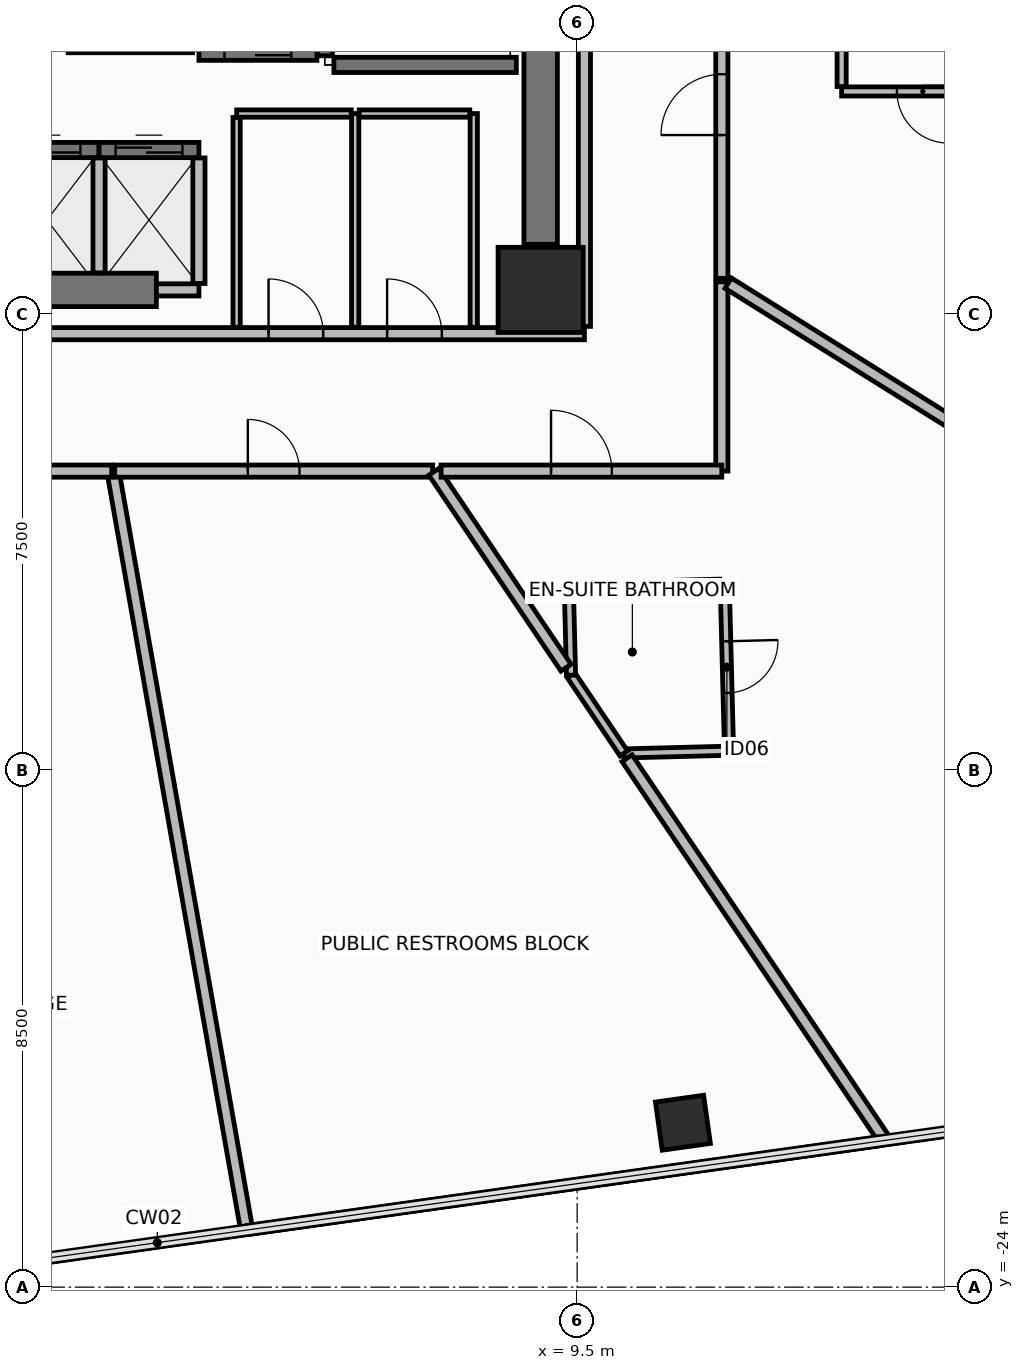
"""IFC4 building model, lengths in metres.
Left out: names, types, materials, properties, quantities, classifications, styles, units other than length and angle.
Written with IfcOpenShell. Run it as: python <this file> out.ifc"""

import sys

from ifc_helpers import new_model, si_unit, direction, frame, frame_2d, origin, origin_2d, place, context, subcontext, project, spatial, rectangle, hollow_rectangle, extrude, element, fill, save


model = new_model("IFC4")
c1 = context("Model", 3, precision=1e-05, world=origin(), true_north=direction((0.0, 1.0)))
c2 = subcontext(c1, "Body", "Model", "MODEL_VIEW")
j1 = project(units=[si_unit("LENGTHUNIT", "METRE"), si_unit("PLANEANGLEUNIT", "RADIAN")], contexts=[c1])
p1 = place(None, origin())
s1 = spatial("IfcSite", under=j1, at=p1, CompositionType="ELEMENT")
p2 = place(p1, origin())
s2 = spatial("IfcBuilding", under=s1, at=p2, CompositionType="ELEMENT")
p3 = place(p2, frame((0.0, 0.0, 57.0)))
s3 = spatial("IfcBuildingStorey", under=s2, at=p3, CompositionType="ELEMENT", Elevation=57.0)
p4 = place(p3, frame((8.9, -7.6, 0.0), z_axis=(0.0, 0.0, 1.0), x_axis=(1.0, 0.0, 0.0)))
e1 = element("IfcColumn", 1, at=p4, inside=s3, PredefinedType="COLUMN", context=c2, shape_type="SweptSolid", body=[
    extrude(rectangle(XDim=1.4, YDim=1.4, at=origin_2d()), origin(), (0.0, 0.0, 1.0), 3.45),
])
p5 = place(p3, frame((11.24, -21.296, 0.0), z_axis=(0.0, 0.0, 1.0), x_axis=(0.990268068742, 0.13917310096, 0.0)))
e2 = element("IfcColumn", 2, at=p5, inside=s3, PredefinedType="COLUMN", context=c2, shape_type="SweptSolid", body=[
    extrude(hollow_rectangle(XDim=0.8, YDim=0.8, WallThickness=0.045, at=origin_2d()), origin(), (0.0, 0.0, 1.0), 3.45),
])
p6 = place(p3, frame((-2.8, -7.6, 0.0), z_axis=(0.0, 0.0, 1.0), x_axis=(1.0, 0.0, 0.0)))
e3 = element("IfcWall", 3, at=p6, inside=s3, PredefinedType="SHEAR", context=c2, shape_type="SweptSolid", body=[
    extrude(rectangle(XDim=5.38, YDim=0.55, at=frame_2d((2.69, 0.0))), origin(), (0.0, 0.0, 1.0), 3.275),
])
p7 = place(p3, frame((8.9, -6.85, 0.0), z_axis=(0.0, 0.0, 1.0), x_axis=(0.0, 1.0, 0.0)))
e4 = element("IfcWall", 4, at=p7, inside=s3, PredefinedType="SHEAR", context=c2, shape_type="SweptSolid", body=[
    extrude(rectangle(XDim=10.7, YDim=0.55, at=frame_2d((5.35, 0.0))), origin(), (0.0, 0.0, 1.0), 3.275),
])
p8 = place(p3, frame((-9.62, -8.32, 0.0), z_axis=(0.0, 0.0, 1.0), x_axis=(1.0, 0.0, 0.0)))
e5 = element("IfcWall", 5, at=p8, inside=s3, PredefinedType="PARTITIONING", context=c2, shape_type="SweptSolid", body=[
    extrude(rectangle(XDim=19.24, YDim=0.2, at=frame_2d((9.62, 0.0))), origin(), (0.0, 0.0, 1.0), 2.67),
])
p9 = place(p8, frame((14.045, 0.0, 0.0)))
e6 = element("IfcOpeningElement", 6, at=p9, cuts=e5, PredefinedType="OPENING", context=c2, shape_type="SweptSolid", body=[
    extrude(rectangle(XDim=0.9, YDim=2.1, at=frame_2d((0.45, 1.05))), frame((0.0, 0.11, 0.0), z_axis=(0.0, -1.0, 0.0), x_axis=(1.0, 0.0, 0.0)), (0.0, 0.0, 1.0), 0.22),
])
p10 = place(p8, frame((15.995, 0.0, 0.0)))
e7 = element("IfcOpeningElement", 7, at=p10, cuts=e5, PredefinedType="OPENING", context=c2, shape_type="SweptSolid", body=[
    extrude(rectangle(XDim=0.9, YDim=2.1, at=frame_2d((0.45, 1.05))), frame((0.0, 0.11, 0.0), z_axis=(0.0, -1.0, 0.0), x_axis=(1.0, 0.0, 0.0)), (0.0, 0.0, 1.0), 0.22),
])
p11 = place(p3, frame((9.62, -8.2, 0.0), z_axis=(0.0, 0.0, 1.0), x_axis=(0.0, 1.0, 0.0)))
e8 = element("IfcWall", 8, at=p11, inside=s3, PredefinedType="PARTITIONING", context=c2, shape_type="SweptSolid", body=[
    extrude(rectangle(XDim=16.4, YDim=0.2, at=frame_2d((8.2, 0.0))), origin(), (0.0, 0.0, 1.0), 2.67),
])
p12 = place(p11, frame((12.65, 0.0, 0.0)))
e9 = element("IfcOpeningElement", 9, at=p12, cuts=e8, PredefinedType="OPENING", context=c2, shape_type="SweptSolid", body=[
    extrude(rectangle(XDim=1.1, YDim=2.15, at=frame_2d((0.55, 1.075))), frame((0.0, 0.11, 0.0), z_axis=(0.0, -1.0, 0.0), x_axis=(1.0, 0.0, 0.0)), (0.0, 0.0, 1.0), 0.22),
])
p13 = place(p3, frame((5.35, -3.75, 0.0), z_axis=(0.0, 0.0, 1.0), x_axis=(0.0, 1.0, 0.0)))
e10 = element("IfcWall", 10, at=p13, inside=s3, PredefinedType="SHEAR", context=c2, shape_type="SweptSolid", body=[
    extrude(rectangle(XDim=7.3, YDim=0.25, at=frame_2d((3.65, 0.0))), origin(), (0.0, 0.0, 1.0), 3.275),
])
p14 = place(p3, frame((5.5, -3.9, 0.0), z_axis=(0.0, 0.0, 1.0), x_axis=(1.0, 0.0, 0.0)))
e11 = element("IfcWall", 11, at=p14, inside=s3, PredefinedType="SHEAR", context=c2, shape_type="SweptSolid", body=[
    extrude(rectangle(XDim=3.0, YDim=0.25, at=frame_2d((1.5, 0.0))), origin(), (0.0, 0.0, 1.0), 3.275),
])
p15 = place(p3, frame((-0.075, -5.3, 0.0), z_axis=(0.0, 0.0, 1.0), x_axis=(1.0, 0.0, 0.0)))
e12 = element("IfcWall", 12, at=p15, inside=s3, PredefinedType="SHEAR", context=c2, shape_type="SweptSolid", body=[
    extrude(rectangle(XDim=1.712, YDim=0.25, at=frame_2d((0.856, 0.0))), origin(), (0.0, 0.0, 1.0), 3.275),
])
p16 = place(p15, frame((0.306, 0.0, 0.0)))
e13 = element("IfcOpeningElement", 13, at=p16, cuts=e12, PredefinedType="OPENING", context=c2, shape_type="SweptSolid", body=[
    extrude(rectangle(XDim=1.1, YDim=2.2, at=frame_2d((0.55, 1.1))), frame((0.0, 0.135, 0.0), z_axis=(0.0, -1.0, 0.0), x_axis=(1.0, 0.0, 0.0)), (0.0, 0.0, 1.0), 0.27),
])
p17 = place(p3, frame((1.637, -7.32, 0.0), z_axis=(0.0, 0.0, 1.0), x_axis=(0.0, 1.0, 0.0)))
e14 = element("IfcWall", 14, at=p17, inside=s3, PredefinedType="PARTITIONING", context=c2, shape_type="SweptSolid", body=[
    extrude(rectangle(XDim=1.89, YDim=0.2, at=frame_2d((0.945, 0.0))), origin(), (0.0, 0.0, 1.0), 3.275),
])
p18 = place(p3, frame((1.637, -5.3, 0.0), z_axis=(0.0, 0.0, 1.0), x_axis=(1.0, 0.0, 0.0)))
e15 = element("IfcWall", 15, at=p18, inside=s3, PredefinedType="SHEAR", context=c2, shape_type="SweptSolid", body=[
    extrude(rectangle(XDim=1.643, YDim=0.25, at=frame_2d((0.821, 0.0))), origin(), (0.0, 0.0, 1.0), 3.275),
])
p19 = place(p18, frame((0.271, 0.0, 0.0)))
e16 = element("IfcOpeningElement", 16, at=p19, cuts=e15, PredefinedType="OPENING", context=c2, shape_type="SweptSolid", body=[
    extrude(rectangle(XDim=1.1, YDim=2.2, at=frame_2d((0.55, 1.1))), frame((0.0, 0.135, 0.0), z_axis=(0.0, -1.0, 0.0), x_axis=(1.0, 0.0, 0.0)), (0.0, 0.0, 1.0), 0.27),
])
p20 = place(p3, frame((2.58, -7.6, 0.0), z_axis=(0.0, 0.0, 1.0), x_axis=(1.0, 0.0, 0.0)))
e17 = element("IfcWall", 17, at=p20, inside=s3, PredefinedType="PARTITIONING", context=c2, shape_type="SweptSolid", body=[
    extrude(rectangle(XDim=0.7, YDim=0.2, at=frame_2d((0.35, 0.0))), origin(), (0.0, 0.0, 1.0), 2.47),
])
p21 = place(p3, frame((3.28, -7.495, 0.0), z_axis=(0.0, 0.0, 1.0), x_axis=(0.0, 1.0, 0.0)))
e18 = element("IfcWall", 18, at=p21, inside=s3, PredefinedType="PARTITIONING", context=c2, shape_type="SweptSolid", body=[
    extrude(rectangle(XDim=2.065, YDim=0.2, at=frame_2d((1.033, 0.0))), origin(), (0.0, 0.0, 1.0), 2.47),
])
p22 = place(p3, frame((1.13, -3.6, 0.0), z_axis=(0.0, 0.0, 1.0), x_axis=(1.0, 0.0, 0.0)))
e19 = element("IfcWall", 19, at=p22, inside=s3, PredefinedType="PARTITIONING", context=c2, shape_type="SweptSolid", body=[
    extrude(rectangle(XDim=2.045, YDim=0.2, at=frame_2d((1.022, 0.0))), origin(), (0.0, 0.0, 1.0), 3.275),
])
p23 = place(p3, frame((3.28, -3.7, 0.0), z_axis=(0.0, 0.0, 1.0), x_axis=(1.0, 0.0, 0.0)))
e20 = element("IfcWall", 20, at=p23, inside=s3, PredefinedType="SHEAR", context=c2, shape_type="SweptSolid", body=[
    extrude(rectangle(XDim=1.94, YDim=0.25, at=frame_2d((0.97, 0.0))), origin(), (0.0, 0.0, 1.0), 3.275),
])
p24 = place(p23, frame((0.42, 0.0, 0.0)))
e21 = element("IfcOpeningElement", 21, at=p24, cuts=e20, PredefinedType="OPENING", context=c2, shape_type="SweptSolid", body=[
    extrude(rectangle(XDim=1.1, YDim=2.2, at=frame_2d((0.55, 1.1))), frame((0.0, 0.135, 0.0), z_axis=(0.0, -1.0, 0.0), x_axis=(1.0, 0.0, 0.0)), (0.0, 0.0, 1.0), 0.27),
])
p25 = place(p3, frame((5.85, -8.215, 0.0), z_axis=(0.0, 0.0, 1.0), x_axis=(0.0, 1.0, 0.0)))
e22 = element("IfcWall", 22, at=p25, inside=s3, PredefinedType="PARTITIONING", context=c2, shape_type="SweptSolid", body=[
    extrude(rectangle(XDim=3.515, YDim=0.12, at=frame_2d((1.758, 0.0))), origin(), (0.0, 0.0, 1.0), 2.47),
])
p26 = place(p3, frame((5.785, -4.7, 0.0), z_axis=(0.0, 0.0, 1.0), x_axis=(-1.0, 0.0, 0.0)))
e23 = element("IfcWall", 23, at=p26, inside=s3, PredefinedType="PARTITIONING", context=c2, shape_type="SweptSolid", body=[
    extrude(rectangle(XDim=1.885, YDim=0.12, at=frame_2d((0.942, 0.0))), origin(), (0.0, 0.0, 1.0), 3.275),
])
p27 = place(p3, frame((3.9, -4.765, 0.0), z_axis=(0.0, 0.0, 1.0), x_axis=(0.0, -1.0, 0.0)))
e24 = element("IfcWall", 24, at=p27, inside=s3, PredefinedType="PARTITIONING", context=c2, shape_type="SweptSolid", body=[
    extrude(rectangle(XDim=3.45, YDim=0.12, at=frame_2d((1.725, 0.0))), origin(), (0.0, 0.0, 1.0), 2.47),
])
p28 = place(p3, frame((7.8, -8.215, 0.0), z_axis=(0.0, 0.0, 1.0), x_axis=(0.0, 1.0, 0.0)))
e25 = element("IfcWall", 25, at=p28, inside=s3, PredefinedType="PARTITIONING", context=c2, shape_type="SweptSolid", body=[
    extrude(rectangle(XDim=3.515, YDim=0.12, at=frame_2d((1.758, 0.0))), origin(), (0.0, 0.0, 1.0), 2.47),
])
p29 = place(p3, frame((7.735, -4.7, 0.0), z_axis=(0.0, 0.0, 1.0), x_axis=(-1.0, 0.0, 0.0)))
e26 = element("IfcWall", 26, at=p29, inside=s3, PredefinedType="PARTITIONING", context=c2, shape_type="SweptSolid", body=[
    extrude(rectangle(XDim=1.82, YDim=0.12, at=frame_2d((0.91, 0.0))), origin(), (0.0, 0.0, 1.0), 3.275),
])
p30 = place(p3, frame((11.927, -12.429, 0.0), z_axis=(0.0, 0.0, 1.0), x_axis=(0.025746347005, -0.999668507864, 0.0)))
e27 = element("IfcWall", 27, at=p30, inside=s3, PredefinedType="PARTITIONING", context=c2, shape_type="SweptSolid", body=[
    extrude(rectangle(XDim=2.75, YDim=0.15, at=frame_2d((1.375, 0.0))), origin(), (0.0, 0.0, 1.0), 2.87),
])
p31 = place(p30, frame((0.95, 0.0, 0.0)))
e28 = element("IfcOpeningElement", 28, at=p31, cuts=e27, PredefinedType="OPENING", context=c2, shape_type="SweptSolid", body=[
    extrude(rectangle(XDim=0.85, YDim=2.1, at=frame_2d((0.425, 1.05))), frame((0.0, 0.085, 0.0), z_axis=(0.0, -1.0, 0.0), x_axis=(1.0, 0.0, 0.0)), (0.0, 0.0, 1.0), 0.17),
])
p32 = place(p3, frame((11.998, -15.178, 0.0), z_axis=(0.0, 0.0, 1.0), x_axis=(-0.999670410654, -0.025672359918, 0.0)))
e29 = element("IfcWall", 29, at=p32, inside=s3, PredefinedType="PARTITIONING", context=c2, shape_type="SweptSolid", body=[
    extrude(rectangle(XDim=1.731, YDim=0.15, at=frame_2d((0.865, 0.0))), origin(), (0.0, 0.0, 1.0), 2.67),
])
p33 = place(p3, frame((10.268, -15.223, 0.0), z_axis=(0.0, 0.0, 1.0), x_axis=(-0.559229675695, 0.82901276819, 0.0)))
e30 = element("IfcWall", 30, at=p33, inside=s3, PredefinedType="PARTITIONING", context=c2, shape_type="SweptSolid", body=[
    extrude(rectangle(XDim=1.552, YDim=0.15, at=frame_2d((0.776, 0.0))), origin(), (0.0, 0.0, 1.0), 2.67),
])
p34 = place(p3, frame((9.4, -13.936, 0.0), z_axis=(0.0, 0.0, 1.0), x_axis=(-0.025745445057, 0.999668531094, 0.0)))
e31 = element("IfcWall", 31, at=p34, inside=s3, PredefinedType="PARTITIONING", context=c2, shape_type="SweptSolid", body=[
    extrude(rectangle(XDim=1.441, YDim=0.15, at=frame_2d((0.721, 0.0))), origin(), (0.0, 0.0, 1.0), 3.275),
])
p35 = place(p3, frame((9.443, -12.493, 0.0), z_axis=(0.0, 0.0, 1.0), x_axis=(0.999667618691, 0.025780848324, 0.0)))
e32 = element("IfcWall", 32, at=p35, inside=s3, PredefinedType="PARTITIONING", context=c2, shape_type="SweptSolid", body=[
    extrude(rectangle(XDim=2.405, YDim=0.15, at=frame_2d((1.203, 0.0))), origin(), (0.0, 0.0, 1.0), 2.67),
])
p36 = place(p3, frame((16.52, -4.336, 0.0), z_axis=(0.0, 0.0, 1.0), x_axis=(-1.0, 0.0, 0.0)))
e33 = element("IfcWall", 33, at=p36, inside=s3, PredefinedType="PARTITIONING", context=c2, shape_type="SweptSolid", body=[
    extrude(rectangle(XDim=2.67, YDim=0.15, at=frame_2d((1.335, 0.0))), origin(), (0.0, 0.0, 1.0), 2.67),
])
p37 = place(p36, frame((0.91, 0.0, 0.0)))
e34 = element("IfcOpeningElement", 34, at=p37, cuts=e33, PredefinedType="OPENING", context=c2, shape_type="SweptSolid", body=[
    extrude(rectangle(XDim=0.85, YDim=2.1, at=frame_2d((0.425, 1.05))), frame((0.0, 0.085, 0.0), z_axis=(0.0, -1.0, 0.0), x_axis=(1.0, 0.0, 0.0)), (0.0, 0.0, 1.0), 0.17),
])
p38 = place(p3, frame((13.85, -4.257, 0.0), z_axis=(0.0, 0.0, 1.0), x_axis=(0.0, 1.0, 0.0)))
e35 = element("IfcWall", 35, at=p38, inside=s3, PredefinedType="PARTITIONING", context=c2, shape_type="SweptSolid", body=[
    extrude(rectangle(XDim=2.229, YDim=0.15, at=frame_2d((1.115, 0.0))), origin(), (0.0, 0.0, 1.0), 2.87),
])
p39 = place(p3, frame((4.062, -23.038, 0.0), z_axis=(0.0, 0.0, 1.0), x_axis=(-0.173658422676, 0.984805946486, 0.0)))
e36 = element("IfcWall", 36, at=p39, inside=s3, PredefinedType="PARTITIONING", context=c2, shape_type="SweptSolid", body=[
    extrude(rectangle(XDim=12.62, YDim=0.2, at=frame_2d((6.31, 0.0))), origin(), (0.0, 0.0, 1.0), 2.47),
])
p40 = place(p3, frame((1.895, -10.58, 0.0), z_axis=(0.0, 0.0, 1.0), x_axis=(1.0, 0.0, 0.0)))
e37 = element("IfcWall", 37, at=p40, inside=s3, PredefinedType="PARTITIONING", context=c2, shape_type="SweptSolid", body=[
    extrude(rectangle(XDim=5.228, YDim=0.2, at=frame_2d((2.614, 0.0))), origin(), (0.0, 0.0, 1.0), 3.275),
])
p41 = place(p40, frame((2.189, 0.0, 0.0)))
e38 = element("IfcOpeningElement", 38, at=p41, cuts=e37, PredefinedType="OPENING", context=c2, shape_type="SweptSolid", body=[
    extrude(rectangle(XDim=0.85, YDim=2.1, at=frame_2d((0.425, 1.05))), frame((0.0, 0.11, 0.0), z_axis=(0.0, -1.0, 0.0), x_axis=(1.0, 0.0, 0.0)), (0.0, 0.0, 1.0), 0.22),
])
p42 = place(p3, frame((7.144, -10.591, 0.0), z_axis=(0.0, 0.0, 1.0), x_axis=(0.559171794076, -0.829051810631, 0.0)))
e39 = element("IfcWall", 39, at=p42, inside=s3, PredefinedType="PARTITIONING", context=c2, shape_type="SweptSolid", body=[
    extrude(rectangle(XDim=3.886, YDim=0.2, at=frame_2d((1.943, 0.0))), origin(), (0.0, 0.0, 1.0), 3.275),
])
p43 = place(p3, frame((10.321, -15.302, 0.0), z_axis=(0.0, 0.0, 1.0), x_axis=(0.559202924042, -0.829030813506, 0.0)))
e40 = element("IfcWall", 40, at=p43, inside=s3, PredefinedType="PARTITIONING", context=c2, shape_type="SweptSolid", body=[
    extrude(rectangle(XDim=7.581, YDim=0.2, at=frame_2d((3.791, 0.0))), origin(), (0.0, 0.0, 1.0), 2.47),
])
p44 = place(p3, frame((14.445, -21.603, 0.0), z_axis=(0.0, 0.0, 1.0), x_axis=(-0.990270056923, -0.139158953581, 0.0)))
e41 = element("IfcWall", 41, at=p44, inside=s3, PredefinedType="PARTITIONING", context=c2, shape_type="SweptSolid", body=[
    extrude(rectangle(XDim=10.456, YDim=0.15, at=frame_2d((5.228, 0.0))), origin(), (0.0, 0.0, 1.0), 3.275),
])
p45 = place(p3, frame((-2.618, -10.58, 0.0), z_axis=(0.0, 0.0, 1.0), x_axis=(1.0, 0.0, 0.0)))
e42 = element("IfcWall", 42, at=p45, inside=s3, PredefinedType="PARTITIONING", context=c2, shape_type="SweptSolid", body=[
    extrude(rectangle(XDim=4.463, YDim=0.2, at=frame_2d((2.231, 0.0))), origin(), (0.0, 0.0, 1.0), 3.275),
])
p46 = place(p45, frame((1.631, 0.0, 0.0)))
e43 = element("IfcOpeningElement", 43, at=p46, cuts=e42, PredefinedType="OPENING", context=c2, shape_type="SweptSolid", body=[
    extrude(rectangle(XDim=1.2, YDim=2.15, at=frame_2d((0.6, 1.075))), frame((0.0, 0.11, 0.0), z_axis=(0.0, -1.0, 0.0), x_axis=(1.0, 0.0, 0.0)), (0.0, 0.0, 1.0), 0.22),
])
p47 = place(p3, frame((11.88, -10.579, 0.0), z_axis=(0.0, 0.0, 1.0), x_axis=(0.0, 1.0, 0.0)))
e44 = element("IfcWall", 44, at=p47, inside=s3, PredefinedType="PARTITIONING", context=c2, shape_type="SweptSolid", body=[
    extrude(rectangle(XDim=3.111, YDim=0.2, at=frame_2d((1.555, 0.0))), origin(), (0.0, 0.0, 1.0), 2.67),
])
p48 = place(p3, frame((11.985, -7.489, 0.0), z_axis=(0.0, 0.0, 1.0), x_axis=(0.848049281921, -0.529917366608, 0.0)))
e45 = element("IfcWall", 45, at=p48, inside=s3, PredefinedType="PARTITIONING", context=c2, shape_type="SweptSolid", body=[
    extrude(rectangle(XDim=19.908, YDim=0.2, at=frame_2d((9.954, 0.0))), origin(), (0.0, 0.0, 1.0), 2.47),
])
p49 = place(p3, frame((7.263, -10.58, 0.0), z_axis=(0.0, 0.0, 1.0), x_axis=(1.0, 0.0, 0.0)))
e46 = element("IfcWall", 46, at=p49, inside=s3, PredefinedType="PARTITIONING", context=c2, shape_type="SweptSolid", body=[
    extrude(rectangle(XDim=4.616, YDim=0.2, at=frame_2d((2.308, 0.0))), origin(), (0.0, 0.0, 1.0), 2.67),
])
p50 = place(p49, frame((1.808, 0.0, 0.0)))
e47 = element("IfcOpeningElement", 47, at=p50, cuts=e46, PredefinedType="OPENING", context=c2, shape_type="SweptSolid", body=[
    extrude(rectangle(XDim=1.0, YDim=2.15, at=frame_2d((0.5, 1.075))), frame((0.0, 0.11, 0.0), z_axis=(0.0, -1.0, 0.0), x_axis=(1.0, 0.0, 0.0)), (0.0, 0.0, 1.0), 0.22),
])
p51 = place(p3, frame((11.88, -7.41, 0.0), z_axis=(0.0, 0.0, 1.0), x_axis=(0.0, 1.0, 0.0)))
e48 = element("IfcWall", 48, at=p51, inside=s3, PredefinedType="PARTITIONING", context=c2, shape_type="SweptSolid", body=[
    extrude(rectangle(XDim=5.711, YDim=0.2, at=frame_2d((2.855, 0.0))), origin(), (0.0, 0.0, 1.0), 2.67),
])
p52 = place(p51, frame((2.356, 0.0, 0.0)))
e49 = element("IfcOpeningElement", 49, at=p52, cuts=e48, PredefinedType="OPENING", context=c2, shape_type="SweptSolid", body=[
    extrude(rectangle(XDim=1.0, YDim=2.15, at=frame_2d((0.5, 1.075))), frame((0.0, 0.11, 0.0), z_axis=(0.0, -1.0, 0.0), x_axis=(1.0, 0.0, 0.0)), (0.0, 0.0, 1.0), 0.22),
])
p53 = place(p16, origin())
e50 = element("IfcDoor", 50, at=p53, inside=s3, OperationType="SLIDING_TO_LEFT", PredefinedType="DOOR", context=c2, shape_type="SweptSolid", body=[
    extrude(rectangle(XDim=1.1, YDim=2.2, at=frame_2d((0.55, 1.1))), frame((0.0, 0.025, 0.0), z_axis=(0.0, -1.0, 0.0), x_axis=(1.0, 0.0, 0.0)), (0.0, 0.0, 1.0), 0.05),
])
fill(e13, e50)
p54 = place(p19, origin())
e51 = element("IfcDoor", 51, at=p54, inside=s3, OperationType="SLIDING_TO_LEFT", PredefinedType="DOOR", context=c2, shape_type="SweptSolid", body=[
    extrude(rectangle(XDim=1.1, YDim=2.2, at=frame_2d((0.55, 1.1))), frame((0.0, 0.025, 0.0), z_axis=(0.0, -1.0, 0.0), x_axis=(1.0, 0.0, 0.0)), (0.0, 0.0, 1.0), 0.05),
])
fill(e16, e51)
p55 = place(p24, origin())
e52 = element("IfcDoor", 52, at=p55, inside=s3, OperationType="SLIDING_TO_LEFT", PredefinedType="DOOR", context=c2, shape_type="SweptSolid", body=[
    extrude(rectangle(XDim=1.1, YDim=2.2, at=frame_2d((0.55, 1.1))), frame((0.0, 0.025, 0.0), z_axis=(0.0, -1.0, 0.0), x_axis=(1.0, 0.0, 0.0)), (0.0, 0.0, 1.0), 0.05),
])
fill(e21, e52)
p56 = place(p9, origin())
e53 = element("IfcDoor", 53, at=p56, inside=s3, OperationType="SINGLE_SWING_LEFT", PredefinedType="DOOR", context=c2, shape_type="SweptSolid", body=[
    extrude(rectangle(XDim=0.9, YDim=2.1, at=frame_2d((0.45, 1.05))), frame((0.0, 0.025, 0.0), z_axis=(0.0, -1.0, 0.0), x_axis=(1.0, 0.0, 0.0)), (0.0, 0.0, 1.0), 0.05),
])
fill(e6, e53)
p57 = place(p10, origin())
e54 = element("IfcDoor", 54, at=p57, inside=s3, OperationType="SINGLE_SWING_LEFT", PredefinedType="DOOR", context=c2, shape_type="SweptSolid", body=[
    extrude(rectangle(XDim=0.9, YDim=2.1, at=frame_2d((0.45, 1.05))), frame((0.0, 0.025, 0.0), z_axis=(0.0, -1.0, 0.0), x_axis=(1.0, 0.0, 0.0)), (0.0, 0.0, 1.0), 0.05),
])
fill(e7, e54)
p58 = place(p31, origin())
e55 = element("IfcDoor", 55, at=p58, inside=s3, OperationType="SINGLE_SWING_RIGHT", PredefinedType="DOOR", context=c2, shape_type="SweptSolid", body=[
    extrude(rectangle(XDim=0.85, YDim=2.1, at=frame_2d((0.425, 1.05))), frame((0.0, 0.025, 0.0), z_axis=(0.0, -1.0, 0.0), x_axis=(1.0, 0.0, 0.0)), (0.0, 0.0, 1.0), 0.05),
])
fill(e28, e55)
p59 = place(p37, origin())
e56 = element("IfcDoor", 56, at=p59, inside=s3, OperationType="SINGLE_SWING_RIGHT", PredefinedType="DOOR", context=c2, shape_type="SweptSolid", body=[
    extrude(rectangle(XDim=0.85, YDim=2.1, at=frame_2d((0.425, 1.05))), frame((0.0, 0.025, 0.0), z_axis=(0.0, -1.0, 0.0), x_axis=(1.0, 0.0, 0.0)), (0.0, 0.0, 1.0), 0.05),
])
fill(e34, e56)
p60 = place(p41, origin())
e57 = element("IfcDoor", 57, at=p60, inside=s3, OperationType="SINGLE_SWING_RIGHT", PredefinedType="DOOR", context=c2, shape_type="SweptSolid", body=[
    extrude(rectangle(XDim=0.85, YDim=2.1, at=frame_2d((0.425, 1.05))), frame((0.0, 0.025, 0.0), z_axis=(0.0, -1.0, 0.0), x_axis=(1.0, 0.0, 0.0)), (0.0, 0.0, 1.0), 0.05),
])
fill(e38, e57)
p61 = place(p50, origin())
e58 = element("IfcDoor", 58, at=p61, inside=s3, OperationType="SINGLE_SWING_LEFT", PredefinedType="DOOR", context=c2, shape_type="SweptSolid", body=[
    extrude(rectangle(XDim=1.0, YDim=2.15, at=frame_2d((0.5, 1.075))), frame((0.0, 0.025, 0.0), z_axis=(0.0, -1.0, 0.0), x_axis=(1.0, 0.0, 0.0)), (0.0, 0.0, 1.0), 0.05),
])
fill(e47, e58)
p62 = place(p52, origin())
e59 = element("IfcDoor", 59, at=p62, inside=s3, OperationType="SINGLE_SWING_LEFT", PredefinedType="DOOR", context=c2, shape_type="SweptSolid", body=[
    extrude(rectangle(XDim=1.0, YDim=2.15, at=frame_2d((0.5, 1.075))), frame((0.0, 0.025, 0.0), z_axis=(0.0, -1.0, 0.0), x_axis=(1.0, 0.0, 0.0)), (0.0, 0.0, 1.0), 0.05),
])
fill(e49, e59)
save(model, sys.argv[1])
